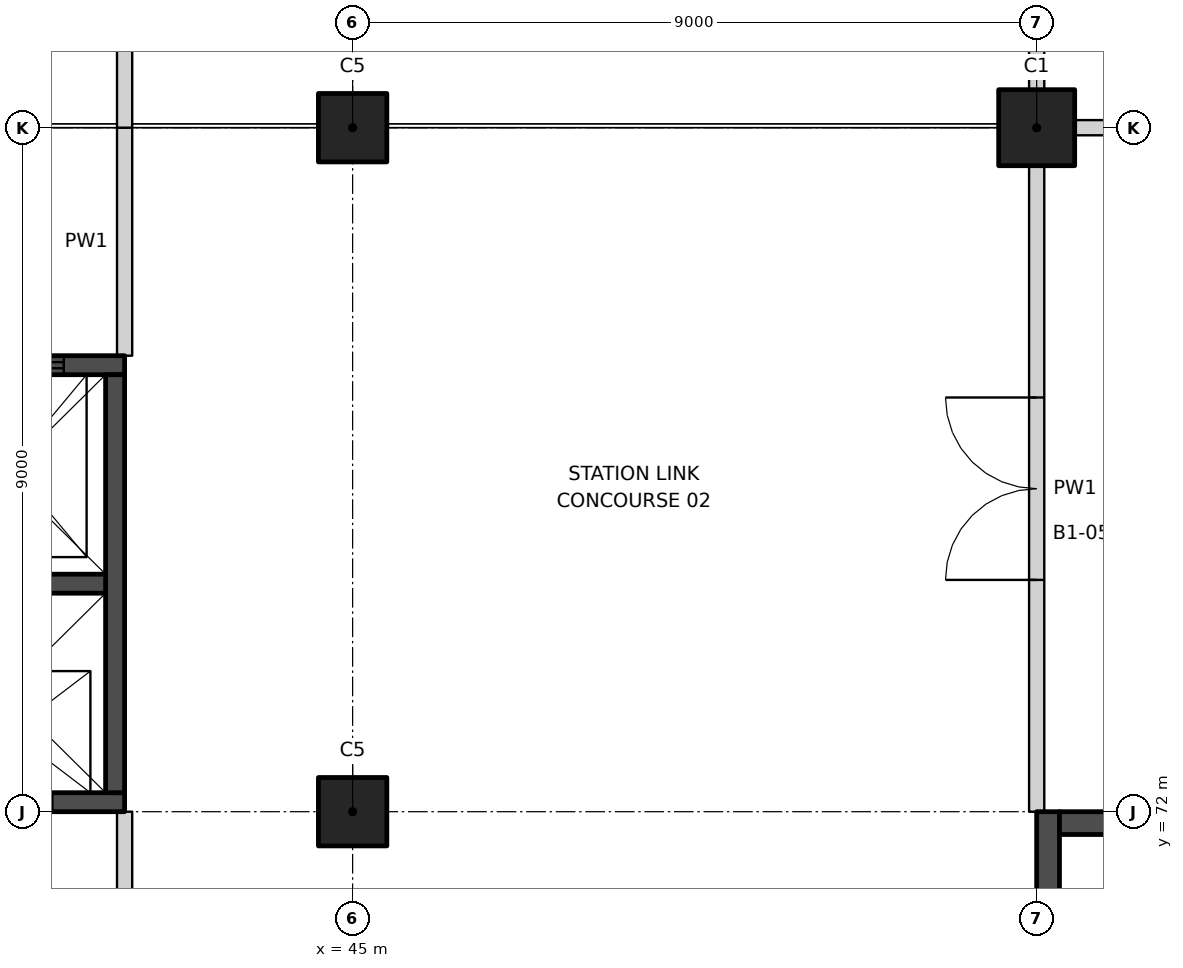
"""IFC4 building model, lengths in metres.
Left out: names, types, materials, properties, quantities, classifications, styles, units other than length and angle.
Written with IfcOpenShell. Run it as: python <this file> out.ifc"""

import sys

from ifc_helpers import new_model, si_unit, direction, frame, frame_2d, origin, origin_2d, place, context, subcontext, project, spatial, rectangle, extrude, element, fill, save


model = new_model("IFC4")
c1 = context("Model", 3, precision=1e-05, world=origin(), true_north=direction((0.0, 1.0)))
c2 = subcontext(c1, "Body", "Model", "MODEL_VIEW")
j1 = project(units=[si_unit("LENGTHUNIT", "METRE"), si_unit("PLANEANGLEUNIT", "RADIAN")], contexts=[c1])
p1 = place(None, origin())
s1 = spatial("IfcSite", under=j1, at=p1, CompositionType="ELEMENT")
p2 = place(p1, origin())
s2 = spatial("IfcBuilding", under=s1, at=p2, CompositionType="ELEMENT")
p3 = place(p2, frame((0.0, 0.0, -6.0)))
s3 = spatial("IfcBuildingStorey", under=s2, at=p3, CompositionType="ELEMENT", Elevation=-6.0)
p4 = place(p3, frame((54.0, 81.0, 0.0), z_axis=(0.0, 0.0, 1.0), x_axis=(1.0, 0.0, 0.0)))
e1 = element("IfcColumn", 1, at=p4, inside=s3, PredefinedType="COLUMN", context=c2, shape_type="SweptSolid", body=[
    extrude(rectangle(XDim=1.0, YDim=1.0, at=origin_2d()), origin(), (0.0, 0.0, 1.0), 6.0),
])
for number, where, z_axis, x_axis in (
    (2, (45.0, 72.0, 0.0), (0.0, 0.0, 1.0), (1.0, 0.0, 0.0)),
    (3, (45.0, 81.0, 0.0), (0.0, 0.0, 1.0), (1.0, 0.0, 0.0)),
):
    element("IfcColumn", number, at=place(p3, frame(where, z_axis=z_axis, x_axis=x_axis)), inside=s3, PredefinedType="COLUMN", context=c2, shape_type="SweptSolid", body=[
        extrude(rectangle(XDim=0.9, YDim=0.9, at=origin_2d()), origin(), (0.0, 0.0, 1.0), 6.0),
    ])
p5 = place(p3, frame((54.5, 81.0, 0.0), z_axis=(0.0, 0.0, 1.0), x_axis=(1.0, 0.0, 0.0)))
e4 = element("IfcWall", 4, at=p5, inside=s3, PredefinedType="PARTITIONING", context=c2, shape_type="SweptSolid", body=[
    extrude(rectangle(XDim=8.05, YDim=0.2, at=frame_2d((4.025, 0.0))), origin(), (0.0, 0.0, 1.0), 4.65),
])
p6 = place(p3, frame((42.0, 66.1, 0.0), z_axis=(0.0, 0.0, 1.0), x_axis=(0.0, 1.0, 0.0)))
e5 = element("IfcWall", 5, at=p6, inside=s3, PredefinedType="PARTITIONING", context=c2, shape_type="SweptSolid", body=[
    extrude(rectangle(XDim=5.9, YDim=0.2, at=frame_2d((2.95, 0.0))), origin(), (0.0, 0.0, 1.0), 6.0),
])
p7 = place(p3, frame((42.0, 78.0, 0.0), z_axis=(0.0, 0.0, 1.0), x_axis=(0.0, 1.0, 0.0)))
e6 = element("IfcWall", 6, at=p7, inside=s3, PredefinedType="PARTITIONING", context=c2, shape_type="SweptSolid", body=[
    extrude(rectangle(XDim=3.0, YDim=0.2, at=frame_2d((1.5, 0.0))), origin(), (0.0, 0.0, 1.0), 6.0),
])
p8 = place(p3, frame((42.0, 81.0, 0.0), z_axis=(0.0, 0.0, 1.0), x_axis=(0.0, 1.0, 0.0)))
e7 = element("IfcWall", 7, at=p8, inside=s3, PredefinedType="PARTITIONING", context=c2, shape_type="SweptSolid", body=[
    extrude(rectangle(XDim=2.9, YDim=0.2, at=frame_2d((1.45, 0.0))), origin(), (0.0, 0.0, 1.0), 6.0),
])
p9 = place(p3, frame((54.0, 72.0, 0.0), z_axis=(0.0, 0.0, 1.0), x_axis=(0.0, 1.0, 0.0)))
e8 = element("IfcWall", 8, at=p9, inside=s3, PredefinedType="PARTITIONING", context=c2, shape_type="SweptSolid", body=[
    extrude(rectangle(XDim=8.5, YDim=0.2, at=frame_2d((4.25, 0.0))), origin(), (0.0, 0.0, 1.0), 4.65),
])
p10 = place(p9, frame((3.05, 0.0, 0.0)))
e9 = element("IfcOpeningElement", 9, at=p10, cuts=e8, PredefinedType="OPENING", context=c2, shape_type="SweptSolid", body=[
    extrude(rectangle(XDim=2.4, YDim=2.4, at=frame_2d((1.2, 1.2))), frame((0.0, 0.11, 0.0), z_axis=(0.0, -1.0, 0.0), x_axis=(1.0, 0.0, 0.0)), (0.0, 0.0, 1.0), 0.22),
])
p11 = place(p3, frame((54.0, 81.5, 0.0), z_axis=(0.0, 0.0, 1.0), x_axis=(0.0, 1.0, 0.0)))
e10 = element("IfcWall", 10, at=p11, inside=s3, PredefinedType="PARTITIONING", context=c2, shape_type="SweptSolid", body=[
    extrude(rectangle(XDim=8.5, YDim=0.2, at=frame_2d((4.25, 0.0))), origin(), (0.0, 0.0, 1.0), 4.65),
])
p12 = place(p3, frame((54.15, 54.0, 0.0), z_axis=(0.0, 0.0, 1.0), x_axis=(0.0, 1.0, 0.0)))
e11 = element("IfcWall", 11, at=p12, inside=s3, PredefinedType="SHEAR", context=c2, shape_type="SweptSolid", body=[
    extrude(rectangle(XDim=18.0, YDim=0.3, at=frame_2d((9.0, 0.0))), origin(), (0.0, 0.0, 1.0), 6.0),
])
p13 = place(p12, frame((8.6, 0.0, 0.0)))
e12 = element("IfcOpeningElement", 12, at=p13, cuts=e11, PredefinedType="OPENING", context=c2, shape_type="SweptSolid", body=[
    extrude(rectangle(XDim=1.2, YDim=2.1, at=frame_2d((0.6, 1.05))), frame((0.0, 0.16, 0.0), z_axis=(0.0, -1.0, 0.0), x_axis=(1.0, 0.0, 0.0)), (0.0, 0.0, 1.0), 0.32),
])
p14 = place(p3, frame((62.7, 71.85, 0.0), z_axis=(0.0, 0.0, 1.0), x_axis=(-1.0, 0.0, 0.0)))
e13 = element("IfcWall", 13, at=p14, inside=s3, PredefinedType="SHEAR", context=c2, shape_type="SweptSolid", body=[
    extrude(rectangle(XDim=8.4, YDim=0.3, at=frame_2d((4.2, 0.0))), origin(), (0.0, 0.0, 1.0), 6.0),
])
p15 = place(p3, frame((36.0, 72.125, -1.0), z_axis=(0.0, 0.0, 1.0), x_axis=(1.0, 0.0, 0.0)))
e14 = element("IfcWall", 14, at=p15, inside=s3, PredefinedType="SHEAR", context=c2, shape_type="SweptSolid", body=[
    extrude(rectangle(XDim=6.0, YDim=0.25, at=frame_2d((3.0, 0.0))), origin(), (0.0, 0.0, 1.0), 7.0),
])
p16 = place(p15, frame((0.95, 0.0, 1.0)))
e15 = element("IfcOpeningElement", 15, at=p16, cuts=e14, PredefinedType="OPENING", context=c2, shape_type="SweptSolid", body=[
    extrude(rectangle(XDim=1.1, YDim=2.1, at=frame_2d((0.55, 1.05))), frame((0.0, 0.135, 0.0), z_axis=(0.0, -1.0, 0.0), x_axis=(1.0, 0.0, 0.0)), (0.0, 0.0, 1.0), 0.27),
])
p17 = place(p15, frame((3.95, 0.0, 1.0)))
e16 = element("IfcOpeningElement", 16, at=p17, cuts=e14, PredefinedType="OPENING", context=c2, shape_type="SweptSolid", body=[
    extrude(rectangle(XDim=1.1, YDim=2.1, at=frame_2d((0.55, 1.05))), frame((0.0, 0.135, 0.0), z_axis=(0.0, -1.0, 0.0), x_axis=(1.0, 0.0, 0.0)), (0.0, 0.0, 1.0), 0.27),
])
p18 = place(p3, frame((36.0, 77.875, -1.0), z_axis=(0.0, 0.0, 1.0), x_axis=(1.0, 0.0, 0.0)))
e17 = element("IfcWall", 17, at=p18, inside=s3, PredefinedType="SHEAR", context=c2, shape_type="SweptSolid", body=[
    extrude(rectangle(XDim=6.0, YDim=0.25, at=frame_2d((3.0, 0.0))), origin(), (0.0, 0.0, 1.0), 7.0),
])
p19 = place(p18, frame((0.8, 0.0, 1.0)))
e18 = element("IfcOpeningElement", 18, at=p19, cuts=e17, PredefinedType="OPENING", context=c2, shape_type="SweptSolid", body=[
    extrude(rectangle(XDim=1.4, YDim=2.1, at=frame_2d((0.7, 1.05))), frame((0.0, 0.135, 0.0), z_axis=(0.0, -1.0, 0.0), x_axis=(1.0, 0.0, 0.0)), (0.0, 0.0, 1.0), 0.27),
])
p20 = place(p18, frame((3.8, 0.0, 1.0)))
e19 = element("IfcOpeningElement", 19, at=p20, cuts=e17, PredefinedType="OPENING", context=c2, shape_type="SweptSolid", body=[
    extrude(rectangle(XDim=1.4, YDim=2.1, at=frame_2d((0.7, 1.05))), frame((0.0, 0.135, 0.0), z_axis=(0.0, -1.0, 0.0), x_axis=(1.0, 0.0, 0.0)), (0.0, 0.0, 1.0), 0.27),
])
p21 = place(p3, frame((36.0, 75.0, -1.0), z_axis=(0.0, 0.0, 1.0), x_axis=(1.0, 0.0, 0.0)))
e20 = element("IfcWall", 20, at=p21, inside=s3, PredefinedType="SHEAR", context=c2, shape_type="SweptSolid", body=[
    extrude(rectangle(XDim=6.0, YDim=0.25, at=frame_2d((3.0, 0.0))), origin(), (0.0, 0.0, 1.0), 7.0),
])
p22 = place(p3, frame((41.875, 72.25, -1.0), z_axis=(0.0, 0.0, 1.0), x_axis=(0.0, 1.0, 0.0)))
e21 = element("IfcWall", 21, at=p22, inside=s3, PredefinedType="SHEAR", context=c2, shape_type="SweptSolid", body=[
    extrude(rectangle(XDim=5.5, YDim=0.25, at=frame_2d((2.75, 0.0))), origin(), (0.0, 0.0, 1.0), 7.0),
])
p23 = place(p10, origin())
e22 = element("IfcDoor", 22, at=p23, inside=s3, OperationType="DOUBLE_DOOR_DOUBLE_SWING", PredefinedType="DOOR", context=c2, shape_type="SweptSolid", body=[
    extrude(rectangle(XDim=2.4, YDim=2.4, at=frame_2d((1.2, 1.2))), frame((0.0, 0.025, 0.0), z_axis=(0.0, -1.0, 0.0), x_axis=(1.0, 0.0, 0.0)), (0.0, 0.0, 1.0), 0.05),
])
fill(e9, e22)
p24 = place(p20, origin())
e23 = element("IfcDoor", 23, at=p24, inside=s3, OperationType="DOUBLE_DOOR_SLIDING", PredefinedType="DOOR", context=c2, shape_type="SweptSolid", body=[
    extrude(rectangle(XDim=1.4, YDim=2.1, at=frame_2d((0.7, 1.05))), frame((0.0, 0.025, 0.0), z_axis=(0.0, -1.0, 0.0), x_axis=(1.0, 0.0, 0.0)), (0.0, 0.0, 1.0), 0.05),
])
fill(e19, e23)
save(model, sys.argv[1])
